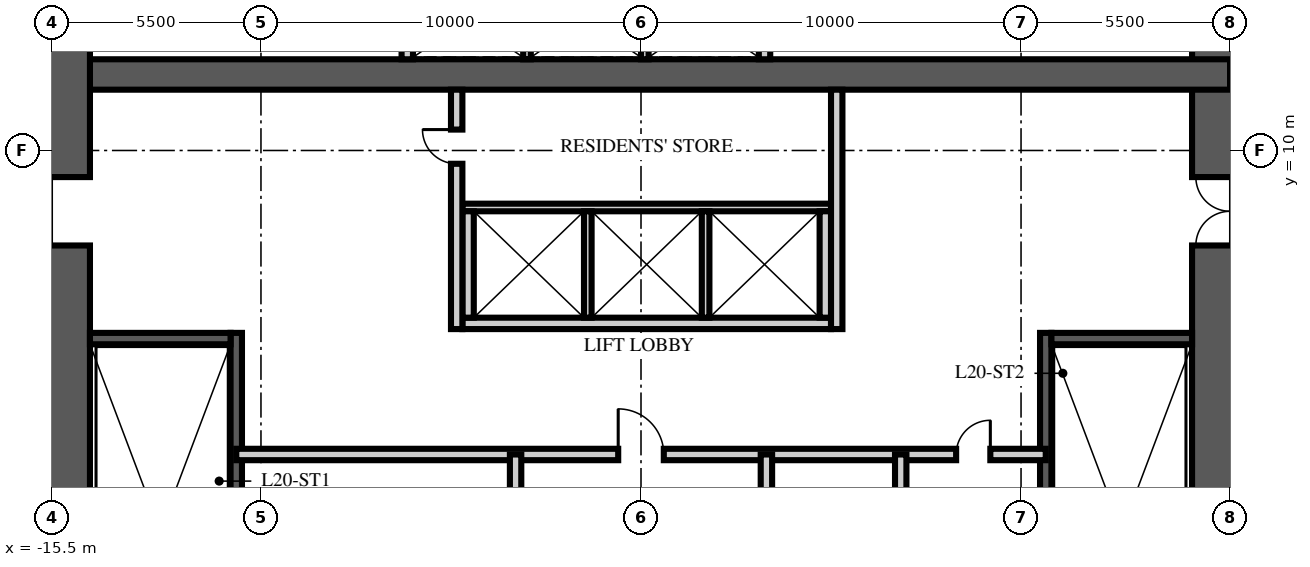
"""IFC4 building model, lengths in metres.
Left out: names, types, materials, properties, quantities, classifications, styles, units other than length and angle.
Written with IfcOpenShell. Run it as: python <this file> out.ifc"""

import sys

from ifc_helpers import new_model, si_unit, direction, frame, frame_2d, origin, place, context, subcontext, project, spatial, rectangle, extrude, element, fill, save


model = new_model("IFC4")
c1 = context("Model", 3, precision=1e-05, world=origin(), true_north=direction((0.0, 1.0)))
c2 = subcontext(c1, "Body", "Model", "MODEL_VIEW")
j1 = project(units=[si_unit("LENGTHUNIT", "METRE"), si_unit("PLANEANGLEUNIT", "RADIAN")], contexts=[c1])
p1 = place(None, origin())
s1 = spatial("IfcSite", under=j1, at=p1, CompositionType="ELEMENT")
p2 = place(p1, origin())
s2 = spatial("IfcBuilding", under=s1, at=p2, CompositionType="ELEMENT")
p3 = place(p2, frame((0.0, 0.0, 81.0)))
s3 = spatial("IfcBuildingStorey", under=s2, at=p3, CompositionType="ELEMENT", Elevation=81.0)
p4 = place(p3, frame((15.5, -15.5, -0.25), z_axis=(0.0, 0.0, 1.0), x_axis=(0.0, 1.0, 0.0)))
e1 = element("IfcWall", 1, at=p4, inside=s3, PredefinedType="SHEAR", context=c2, shape_type="SweptSolid", body=[
    extrude(rectangle(XDim=31.0, YDim=2.0, at=frame_2d((15.5, 0.0))), origin(), (0.0, 0.0, 1.0), 3.75),
])
p5 = place(p4, frame((6.5, 0.0, 0.25)))
e2 = element("IfcOpeningElement", 2, at=p5, cuts=e1, PredefinedType="OPENING", context=c2, shape_type="SweptSolid", body=[
    extrude(rectangle(XDim=1.2, YDim=2.1, at=frame_2d((0.6, 1.05))), frame((0.0, 1.01, 0.0), z_axis=(0.0, -1.0, 0.0), x_axis=(1.0, 0.0, 0.0)), (0.0, 0.0, 1.0), 2.02),
])
p6 = place(p4, frame((23.0, 0.0, 0.25)))
e3 = element("IfcOpeningElement", 3, at=p6, cuts=e1, PredefinedType="OPENING", context=c2, shape_type="SweptSolid", body=[
    extrude(rectangle(XDim=1.8, YDim=2.1, at=frame_2d((0.9, 1.05))), frame((0.0, 1.01, 0.0), z_axis=(0.0, -1.0, 0.0), x_axis=(1.0, 0.0, 0.0)), (0.0, 0.0, 1.0), 2.02),
])
p7 = place(p3, frame((-15.5, 12.0, -0.25), z_axis=(0.0, 0.0, 1.0), x_axis=(1.0, 0.0, 0.0)))
e4 = element("IfcWall", 4, at=p7, inside=s3, PredefinedType="SHEAR", context=c2, shape_type="SweptSolid", body=[
    extrude(rectangle(XDim=31.0, YDim=0.8, at=frame_2d((15.5, 0.0))), origin(), (0.0, 0.0, 1.0), 3.75),
])
p8 = place(p3, frame((-15.5, -15.5, -0.25), z_axis=(0.0, 0.0, 1.0), x_axis=(0.0, 1.0, 0.0)))
e5 = element("IfcWall", 5, at=p8, inside=s3, PredefinedType="SHEAR", context=c2, shape_type="SweptSolid", body=[
    extrude(rectangle(XDim=31.0, YDim=2.0, at=frame_2d((15.5, 0.0))), origin(), (0.0, 0.0, 1.0), 3.75),
])
p9 = place(p8, frame((6.5, 0.0, 0.25)))
e6 = element("IfcOpeningElement", 6, at=p9, cuts=e5, PredefinedType="OPENING", context=c2, shape_type="SweptSolid", body=[
    extrude(rectangle(XDim=1.2, YDim=2.1, at=frame_2d((0.6, 1.05))), frame((0.0, 1.01, 0.0), z_axis=(0.0, -1.0, 0.0), x_axis=(1.0, 0.0, 0.0)), (0.0, 0.0, 1.0), 2.02),
])
p10 = place(p8, frame((23.0, 0.0, 0.25)))
e7 = element("IfcOpeningElement", 7, at=p10, cuts=e5, PredefinedType="OPENING", context=c2, shape_type="SweptSolid", body=[
    extrude(rectangle(XDim=1.8, YDim=2.1, at=frame_2d((0.9, 1.05))), frame((0.0, 1.01, 0.0), z_axis=(0.0, -1.0, 0.0), x_axis=(1.0, 0.0, 0.0)), (0.0, 0.0, 1.0), 2.02),
])
p11 = place(p3, frame((-10.65, -4.9, 0.0), z_axis=(0.0, 0.0, 1.0), x_axis=(0.0, 1.0, 0.0)))
e8 = element("IfcWall", 8, at=p11, inside=s3, PredefinedType="SOLIDWALL", context=c2, shape_type="SweptSolid", body=[
    extrude(rectangle(XDim=10.1, YDim=0.3, at=frame_2d((5.05, 0.0))), origin(), (0.0, 0.0, 1.0), 3.5),
])
p12 = place(p3, frame((-14.5, 5.05, 0.0), z_axis=(0.0, 0.0, 1.0), x_axis=(1.0, 0.0, 0.0)))
e9 = element("IfcWall", 9, at=p12, inside=s3, PredefinedType="SOLIDWALL", context=c2, shape_type="SweptSolid", body=[
    extrude(rectangle(XDim=3.7, YDim=0.3, at=frame_2d((1.85, 0.0))), origin(), (0.0, 0.0, 1.0), 3.5),
])
p13 = place(p3, frame((10.65, -4.9, 0.0), z_axis=(0.0, 0.0, 1.0), x_axis=(0.0, 1.0, 0.0)))
e10 = element("IfcWall", 10, at=p13, inside=s3, PredefinedType="SOLIDWALL", context=c2, shape_type="SweptSolid", body=[
    extrude(rectangle(XDim=10.1, YDim=0.3, at=frame_2d((5.05, 0.0))), origin(), (0.0, 0.0, 1.0), 3.5),
])
p14 = place(p3, frame((14.5, 5.05, 0.0), z_axis=(0.0, 0.0, 1.0), x_axis=(-1.0, 0.0, 0.0)))
e11 = element("IfcWall", 11, at=p14, inside=s3, PredefinedType="SOLIDWALL", context=c2, shape_type="SweptSolid", body=[
    extrude(rectangle(XDim=3.7, YDim=0.3, at=frame_2d((1.85, 0.0))), origin(), (0.0, 0.0, 1.0), 3.5),
])
p15 = place(p3, frame((-4.7, 5.45, 0.0), z_axis=(0.0, 0.0, 1.0), x_axis=(1.0, 0.0, 0.0)))
e12 = element("IfcWall", 12, at=p15, inside=s3, PredefinedType="PARTITIONING", context=c2, shape_type="SweptSolid", body=[
    extrude(rectangle(XDim=9.7, YDim=0.3, at=frame_2d((4.85, 0.0))), origin(), (0.0, 0.0, 1.0), 3.5),
])
p16 = place(p3, frame((-4.7, 8.5, 0.0), z_axis=(0.0, 0.0, 1.0), x_axis=(1.0, 0.0, 0.0)))
e13 = element("IfcWall", 13, at=p16, inside=s3, PredefinedType="PARTITIONING", context=c2, shape_type="SweptSolid", body=[
    extrude(rectangle(XDim=9.7, YDim=0.2, at=frame_2d((4.85, 0.0))), origin(), (0.0, 0.0, 1.0), 3.5),
])
for number, where, z_axis, x_axis in (
    (14, (-4.55, 5.6, 0.0), (0.0, 0.0, 1.0), (0.0, 1.0, 0.0)),
    (15, (4.85, 5.6, 0.0), (0.0, 0.0, 1.0), (0.0, 1.0, 0.0)),
):
    element("IfcWall", number, at=place(p3, frame(where, z_axis=z_axis, x_axis=x_axis)), inside=s3, PredefinedType="PARTITIONING", context=c2, shape_type="SweptSolid", body=[
        extrude(rectangle(XDim=2.8, YDim=0.3, at=frame_2d((1.4, 0.0))), origin(), (0.0, 0.0, 1.0), 3.5),
    ])
for number, where, z_axis, x_axis in (
    (16, (-1.4, 5.6, 0.0), (0.0, 0.0, 1.0), (0.0, 1.0, 0.0)),
    (17, (1.7, 5.6, 0.0), (0.0, 0.0, 1.0), (0.0, 1.0, 0.0)),
):
    element("IfcWall", number, at=place(p3, frame(where, z_axis=z_axis, x_axis=x_axis)), inside=s3, PredefinedType="PARTITIONING", context=c2, shape_type="SweptSolid", body=[
        extrude(rectangle(XDim=2.8, YDim=0.2, at=frame_2d((1.4, 0.0))), origin(), (0.0, 0.0, 1.0), 3.5),
    ])
for number, where, z_axis, x_axis in (
    (18, (-6.15, 12.4, 0.0), (0.0, 0.0, 1.0), (0.0, 1.0, 0.0)),
    (19, (3.25, 12.4, 0.0), (0.0, 0.0, 1.0), (0.0, 1.0, 0.0)),
):
    element("IfcWall", number, at=place(p3, frame(where, z_axis=z_axis, x_axis=x_axis)), inside=s3, PredefinedType="PARTITIONING", context=c2, shape_type="SweptSolid", body=[
        extrude(rectangle(XDim=2.1, YDim=0.3, at=frame_2d((1.05, 0.0))), origin(), (0.0, 0.0, 1.0), 3.5),
    ])
for number, where, z_axis, x_axis in (
    (20, (-3.0, 12.4, 0.0), (0.0, 0.0, 1.0), (0.0, 1.0, 0.0)),
    (21, (0.1, 12.4, 0.0), (0.0, 0.0, 1.0), (0.0, 1.0, 0.0)),
):
    element("IfcWall", number, at=place(p3, frame(where, z_axis=z_axis, x_axis=x_axis)), inside=s3, PredefinedType="PARTITIONING", context=c2, shape_type="SweptSolid", body=[
        extrude(rectangle(XDim=2.1, YDim=0.2, at=frame_2d((1.05, 0.0))), origin(), (0.0, 0.0, 1.0), 3.5),
    ])
p17 = place(p3, frame((-10.65, 2.0, 0.0), z_axis=(0.0, 0.0, 1.0), x_axis=(1.0, 0.0, 0.0)))
e22 = element("IfcWall", 22, at=p17, inside=s3, PredefinedType="PARTITIONING", context=c2, shape_type="SweptSolid", body=[
    extrude(rectangle(XDim=21.3, YDim=0.3, at=frame_2d((10.65, 0.0))), origin(), (0.0, 0.0, 1.0), 3.5),
])
p18 = place(p17, frame((10.05, 0.0, 0.0)))
e23 = element("IfcOpeningElement", 23, at=p18, cuts=e22, PredefinedType="OPENING", context=c2, shape_type="SweptSolid", body=[
    extrude(rectangle(XDim=1.2, YDim=2.1, at=frame_2d((0.6, 1.05))), frame((0.0, 0.16, 0.0), z_axis=(0.0, -1.0, 0.0), x_axis=(1.0, 0.0, 0.0)), (0.0, 0.0, 1.0), 0.32),
])
p19 = place(p17, frame((18.942, 0.0, 0.0)))
e24 = element("IfcOpeningElement", 24, at=p19, cuts=e22, PredefinedType="OPENING", context=c2, shape_type="SweptSolid", body=[
    extrude(rectangle(XDim=0.9, YDim=2.1, at=frame_2d((0.45, 1.05))), frame((0.0, 0.16, 0.0), z_axis=(0.0, -1.0, 0.0), x_axis=(1.0, 0.0, 0.0)), (0.0, 0.0, 1.0), 0.32),
])
p20 = place(p3, frame((-3.3, -6.65, 0.0), z_axis=(0.0, 0.0, 1.0), x_axis=(0.0, 1.0, 0.0)))
e25 = element("IfcWall", 25, at=p20, inside=s3, PredefinedType="PARTITIONING", context=c2, shape_type="SweptSolid", body=[
    extrude(rectangle(XDim=8.65, YDim=0.3, at=frame_2d((4.325, 0.0))), origin(), (0.0, 0.0, 1.0), 3.5),
])
p21 = place(p20, frame((1.75, 0.0, 0.0)))
e26 = element("IfcOpeningElement", 26, at=p21, cuts=e25, PredefinedType="OPENING", context=c2, shape_type="SweptSolid", body=[
    extrude(rectangle(XDim=0.9, YDim=2.1, at=frame_2d((0.45, 1.05))), frame((0.0, 0.16, 0.0), z_axis=(0.0, -1.0, 0.0), x_axis=(1.0, 0.0, 0.0)), (0.0, 0.0, 1.0), 0.32),
])
p22 = place(p20, frame((6.075, 0.0, 0.0)))
e27 = element("IfcOpeningElement", 27, at=p22, cuts=e25, PredefinedType="OPENING", context=c2, shape_type="SweptSolid", body=[
    extrude(rectangle(XDim=0.9, YDim=2.1, at=frame_2d((0.45, 1.05))), frame((0.0, 0.16, 0.0), z_axis=(0.0, -1.0, 0.0), x_axis=(1.0, 0.0, 0.0)), (0.0, 0.0, 1.0), 0.32),
])
p23 = place(p3, frame((3.3, -6.65, 0.0), z_axis=(0.0, 0.0, 1.0), x_axis=(0.0, 1.0, 0.0)))
e28 = element("IfcWall", 28, at=p23, inside=s3, PredefinedType="PARTITIONING", context=c2, shape_type="SweptSolid", body=[
    extrude(rectangle(XDim=8.65, YDim=0.3, at=frame_2d((4.325, 0.0))), origin(), (0.0, 0.0, 1.0), 3.5),
])
p24 = place(p23, frame((3.875, 0.0, 0.0)))
e29 = element("IfcOpeningElement", 29, at=p24, cuts=e28, PredefinedType="OPENING", context=c2, shape_type="SweptSolid", body=[
    extrude(rectangle(XDim=0.9, YDim=2.1, at=frame_2d((0.45, 1.05))), frame((0.0, 0.16, 0.0), z_axis=(0.0, -1.0, 0.0), x_axis=(1.0, 0.0, 0.0)), (0.0, 0.0, 1.0), 0.32),
])
p25 = place(p3, frame((6.834, -6.65, 0.0), z_axis=(0.0, 0.0, 1.0), x_axis=(0.0, 1.0, 0.0)))
e30 = element("IfcWall", 30, at=p25, inside=s3, PredefinedType="PARTITIONING", context=c2, shape_type="SweptSolid", body=[
    extrude(rectangle(XDim=8.65, YDim=0.3, at=frame_2d((4.325, 0.0))), origin(), (0.0, 0.0, 1.0), 3.5),
])
p26 = place(p3, frame((-4.85, 5.3, 0.0), z_axis=(0.0, 0.0, 1.0), x_axis=(0.0, 1.0, 0.0)))
e31 = element("IfcWall", 31, at=p26, inside=s3, PredefinedType="PARTITIONING", context=c2, shape_type="SweptSolid", body=[
    extrude(rectangle(XDim=6.3, YDim=0.3, at=frame_2d((3.15, 0.0))), origin(), (0.0, 0.0, 1.0), 3.5),
])
p27 = place(p26, frame((4.35, 0.0, 0.0)))
e32 = element("IfcOpeningElement", 32, at=p27, cuts=e31, PredefinedType="OPENING", context=c2, shape_type="SweptSolid", body=[
    extrude(rectangle(XDim=0.9, YDim=2.1, at=frame_2d((0.45, 1.05))), frame((0.0, 0.16, 0.0), z_axis=(0.0, -1.0, 0.0), x_axis=(1.0, 0.0, 0.0)), (0.0, 0.0, 1.0), 0.32),
])
p28 = place(p3, frame((5.15, 5.3, 0.0), z_axis=(0.0, 0.0, 1.0), x_axis=(0.0, 1.0, 0.0)))
e33 = element("IfcWall", 33, at=p28, inside=s3, PredefinedType="PARTITIONING", context=c2, shape_type="SweptSolid", body=[
    extrude(rectangle(XDim=6.3, YDim=0.3, at=frame_2d((3.15, 0.0))), origin(), (0.0, 0.0, 1.0), 3.5),
])
p29 = place(p10, origin())
e34 = element("IfcDoor", 34, at=p29, inside=s3, OperationType="DOUBLE_DOOR_SINGLE_SWING", PredefinedType="DOOR", context=c2, shape_type="SweptSolid", body=[
    extrude(rectangle(XDim=1.8, YDim=2.1, at=frame_2d((0.9, 1.05))), frame((0.0, 0.025, 0.0), z_axis=(0.0, -1.0, 0.0), x_axis=(1.0, 0.0, 0.0)), (0.0, 0.0, 1.0), 0.05),
])
fill(e7, e34)
p30 = place(p6, origin())
e35 = element("IfcDoor", 35, at=p30, inside=s3, OperationType="DOUBLE_DOOR_SINGLE_SWING", PredefinedType="DOOR", context=c2, shape_type="SweptSolid", body=[
    extrude(rectangle(XDim=1.8, YDim=2.1, at=frame_2d((0.9, 1.05))), frame((0.0, 0.025, 0.0), z_axis=(0.0, -1.0, 0.0), x_axis=(1.0, 0.0, 0.0)), (0.0, 0.0, 1.0), 0.05),
])
fill(e3, e35)
p31 = place(p18, origin())
e36 = element("IfcDoor", 36, at=p31, inside=s3, OperationType="SINGLE_SWING_LEFT", PredefinedType="DOOR", context=c2, shape_type="SweptSolid", body=[
    extrude(rectangle(XDim=1.2, YDim=2.1, at=frame_2d((0.6, 1.05))), frame((0.0, 0.025, 0.0), z_axis=(0.0, -1.0, 0.0), x_axis=(1.0, 0.0, 0.0)), (0.0, 0.0, 1.0), 0.05),
])
fill(e23, e36)
p32 = place(p19, origin())
e37 = element("IfcDoor", 37, at=p32, inside=s3, OperationType="SINGLE_SWING_RIGHT", PredefinedType="DOOR", context=c2, shape_type="SweptSolid", body=[
    extrude(rectangle(XDim=0.9, YDim=2.1, at=frame_2d((0.45, 1.05))), frame((0.0, 0.025, 0.0), z_axis=(0.0, -1.0, 0.0), x_axis=(1.0, 0.0, 0.0)), (0.0, 0.0, 1.0), 0.05),
])
fill(e24, e37)
p33 = place(p27, origin())
e38 = element("IfcDoor", 38, at=p33, inside=s3, OperationType="SINGLE_SWING_RIGHT", PredefinedType="DOOR", context=c2, shape_type="SweptSolid", body=[
    extrude(rectangle(XDim=0.9, YDim=2.1, at=frame_2d((0.45, 1.05))), frame((0.0, 0.025, 0.0), z_axis=(0.0, -1.0, 0.0), x_axis=(1.0, 0.0, 0.0)), (0.0, 0.0, 1.0), 0.05),
])
fill(e32, e38)
save(model, sys.argv[1])
